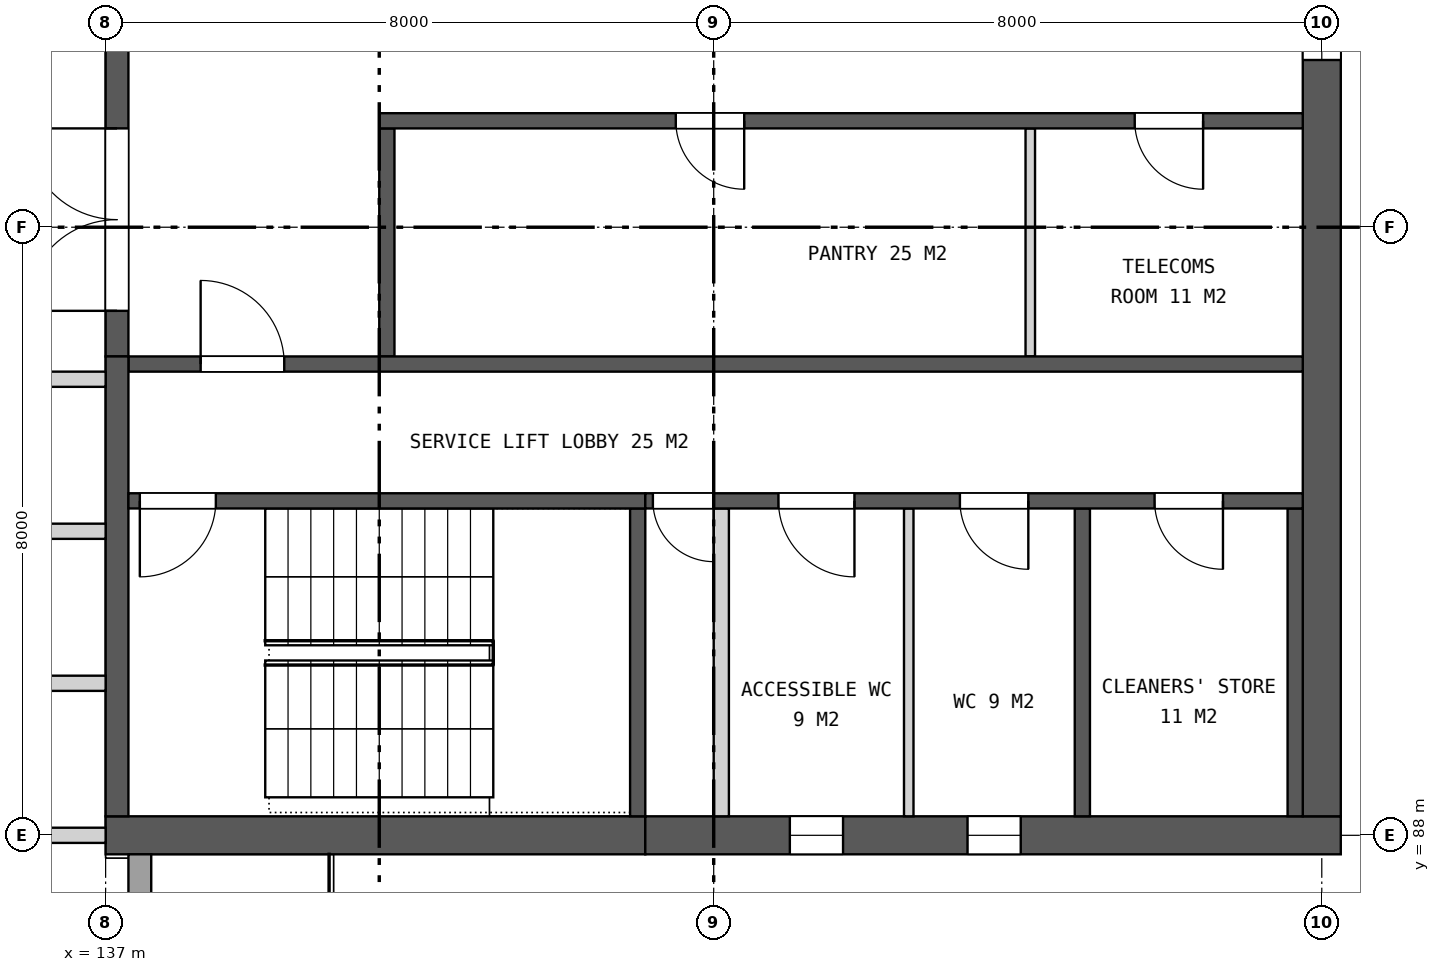
"""IFC4 building model, lengths in metres.
Left out: names, types, materials, properties, quantities, classifications, styles, units other than length and angle.
Written with IfcOpenShell. Run it as: python <this file> out.ifc"""

import sys

from ifc_helpers import new_model, si_unit, direction, frame, frame_2d, origin, place, context, subcontext, project, spatial, rectangle, extrude, element, fill, save


model = new_model("IFC4")
c1 = context("Model", 3, precision=1e-05, world=origin(), true_north=direction((0.0, 1.0)))
c2 = subcontext(c1, "Body", "Model", "MODEL_VIEW")
j1 = project(units=[si_unit("LENGTHUNIT", "METRE"), si_unit("PLANEANGLEUNIT", "RADIAN")], contexts=[c1])
p1 = place(None, origin())
s1 = spatial("IfcSite", under=j1, at=p1, CompositionType="ELEMENT")
p2 = place(p1, origin())
s2 = spatial("IfcBuilding", under=s1, at=p2, CompositionType="ELEMENT")
p3 = place(p2, frame((0.0, 0.0, 245.1)))
s3 = spatial("IfcBuildingStorey", under=s2, at=p3, CompositionType="ELEMENT", Elevation=245.1)
p4 = place(p3, frame((137.0, 88.0, 0.0), z_axis=(0.0, 0.0, 1.0), x_axis=(1.0, 0.0, 0.0)))
e1 = element("IfcWall", 1, at=p4, inside=s3, PredefinedType="SHEAR", context=c2, shape_type="SweptSolid", body=[
    extrude(rectangle(XDim=7.1, YDim=0.5, at=frame_2d((3.55, 0.0))), origin(), (0.0, 0.0, 1.0), 4.2),
])
p5 = place(p3, frame((144.1, 88.0, 0.0), z_axis=(0.0, 0.0, 1.0), x_axis=(1.0, 0.0, 0.0)))
e2 = element("IfcWall", 2, at=p5, inside=s3, PredefinedType="SHEAR", context=c2, shape_type="SweptSolid", body=[
    extrude(rectangle(XDim=9.15, YDim=0.5, at=frame_2d((4.575, 0.0))), origin(), (0.0, 0.0, 1.0), 4.2),
])
p6 = place(p5, frame((1.902, 0.0, 1.5)))
e3 = element("IfcOpeningElement", 3, at=p6, cuts=e2, PredefinedType="OPENING", context=c2, shape_type="SweptSolid", body=[
    extrude(rectangle(XDim=0.7, YDim=0.9, at=frame_2d((0.35, 0.45))), frame((0.0, 0.26, 0.0), z_axis=(0.0, -1.0, 0.0), x_axis=(1.0, 0.0, 0.0)), (0.0, 0.0, 1.0), 0.52),
])
p7 = place(p5, frame((4.239, 0.0, 1.5)))
e4 = element("IfcOpeningElement", 4, at=p7, cuts=e2, PredefinedType="OPENING", context=c2, shape_type="SweptSolid", body=[
    extrude(rectangle(XDim=0.7, YDim=0.9, at=frame_2d((0.35, 0.45))), frame((0.0, 0.26, 0.0), z_axis=(0.0, -1.0, 0.0), x_axis=(1.0, 0.0, 0.0)), (0.0, 0.0, 1.0), 0.52),
])
p8 = place(p3, frame((153.0, 88.25, 0.0), z_axis=(0.0, 0.0, 1.0), x_axis=(0.0, 1.0, 0.0)))
e5 = element("IfcWall", 5, at=p8, inside=s3, PredefinedType="SHEAR", context=c2, shape_type="SweptSolid", body=[
    extrude(rectangle(XDim=23.5, YDim=0.5, at=frame_2d((11.75, 0.0))), origin(), (0.0, 0.0, 1.0), 4.2),
])
p9 = place(p8, frame((9.95, 0.0, 0.15)))
e6 = element("IfcOpeningElement", 6, at=p9, cuts=e5, PredefinedType="OPENING", context=c2, shape_type="SweptSolid", body=[
    extrude(rectangle(XDim=3.6, YDim=3.0, at=frame_2d((1.8, 1.5))), frame((0.0, 0.26, 0.0), z_axis=(0.0, -1.0, 0.0), x_axis=(1.0, 0.0, 0.0)), (0.0, 0.0, 1.0), 0.52),
])
p10 = place(p3, frame((137.15, 94.3, 0.0), z_axis=(0.0, 0.0, 1.0), x_axis=(0.0, 1.0, 0.0)))
e7 = element("IfcWall", 7, at=p10, inside=s3, PredefinedType="SHEAR", context=c2, shape_type="SweptSolid", body=[
    extrude(rectangle(XDim=11.4, YDim=0.3, at=frame_2d((5.7, 0.0))), origin(), (0.0, 0.0, 1.0), 4.2),
])
p11 = place(p10, frame((0.6, 0.0, 0.0)))
e8 = element("IfcOpeningElement", 8, at=p11, cuts=e7, PredefinedType="OPENING", context=c2, shape_type="SweptSolid", body=[
    extrude(rectangle(XDim=2.4, YDim=2.4, at=frame_2d((1.2, 1.2))), frame((0.0, 0.16, 0.0), z_axis=(0.0, -1.0, 0.0), x_axis=(1.0, 0.0, 0.0)), (0.0, 0.0, 1.0), 0.32),
])
p12 = place(p10, frame((4.5, 0.0, 0.0)))
e9 = element("IfcOpeningElement", 9, at=p12, cuts=e7, PredefinedType="OPENING", context=c2, shape_type="SweptSolid", body=[
    extrude(rectangle(XDim=2.4, YDim=2.4, at=frame_2d((1.2, 1.2))), frame((0.0, 0.16, 0.0), z_axis=(0.0, -1.0, 0.0), x_axis=(1.0, 0.0, 0.0)), (0.0, 0.0, 1.0), 0.32),
])
p13 = place(p10, frame((8.4, 0.0, 0.0)))
e10 = element("IfcOpeningElement", 10, at=p13, cuts=e7, PredefinedType="OPENING", context=c2, shape_type="SweptSolid", body=[
    extrude(rectangle(XDim=2.4, YDim=2.4, at=frame_2d((1.2, 1.2))), frame((0.0, 0.16, 0.0), z_axis=(0.0, -1.0, 0.0), x_axis=(1.0, 0.0, 0.0)), (0.0, 0.0, 1.0), 0.32),
])
p14 = place(p3, frame((140.7, 94.3, 0.0), z_axis=(0.0, 0.0, 1.0), x_axis=(0.0, 1.0, 0.0)))
e11 = element("IfcWall", 11, at=p14, inside=s3, PredefinedType="SHEAR", context=c2, shape_type="SweptSolid", body=[
    extrude(rectangle(XDim=3.0, YDim=0.2, at=frame_2d((1.5, 0.0))), origin(), (0.0, 0.0, 1.0), 4.2),
])
p15 = place(p3, frame((149.165, 94.3, 0.0), z_axis=(0.0, 0.0, 1.0), x_axis=(0.0, 1.0, 0.0)))
e12 = element("IfcWall", 12, at=p15, inside=s3, PredefinedType="PARTITIONING", context=c2, shape_type="SweptSolid", body=[
    extrude(rectangle(XDim=3.0, YDim=0.125, at=frame_2d((1.5, 0.0))), origin(), (0.0, 0.0, 1.0), 4.2),
])
p16 = place(p3, frame((140.6, 97.4, 0.0), z_axis=(0.0, 0.0, 1.0), x_axis=(1.0, 0.0, 0.0)))
e13 = element("IfcWall", 13, at=p16, inside=s3, PredefinedType="SHEAR", context=c2, shape_type="SweptSolid", body=[
    extrude(rectangle(XDim=12.15, YDim=0.2, at=frame_2d((6.075, 0.0))), origin(), (0.0, 0.0, 1.0), 4.2),
])
p17 = place(p16, frame((3.901, 0.0, 0.0)))
e14 = element("IfcOpeningElement", 14, at=p17, cuts=e13, PredefinedType="OPENING", context=c2, shape_type="SweptSolid", body=[
    extrude(rectangle(XDim=0.9, YDim=2.1, at=frame_2d((0.45, 1.05))), frame((0.0, 0.11, 0.0), z_axis=(0.0, -1.0, 0.0), x_axis=(1.0, 0.0, 0.0)), (0.0, 0.0, 1.0), 0.22),
])
p18 = place(p16, frame((9.939, 0.0, 0.0)))
e15 = element("IfcOpeningElement", 15, at=p18, cuts=e13, PredefinedType="OPENING", context=c2, shape_type="SweptSolid", body=[
    extrude(rectangle(XDim=0.9, YDim=2.1, at=frame_2d((0.45, 1.05))), frame((0.0, 0.11, 0.0), z_axis=(0.0, -1.0, 0.0), x_axis=(1.0, 0.0, 0.0)), (0.0, 0.0, 1.0), 0.22),
])
p19 = place(p3, frame((137.3, 94.2, 0.0), z_axis=(0.0, 0.0, 1.0), x_axis=(1.0, 0.0, 0.0)))
e16 = element("IfcWall", 16, at=p19, inside=s3, PredefinedType="SHEAR", context=c2, shape_type="SweptSolid", body=[
    extrude(rectangle(XDim=15.45, YDim=0.2, at=frame_2d((7.725, 0.0))), origin(), (0.0, 0.0, 1.0), 4.2),
])
p20 = place(p19, frame((0.95, 0.0, 0.0)))
e17 = element("IfcOpeningElement", 17, at=p20, cuts=e16, PredefinedType="OPENING", context=c2, shape_type="SweptSolid", body=[
    extrude(rectangle(XDim=1.1, YDim=2.1, at=frame_2d((0.55, 1.05))), frame((0.0, 0.11, 0.0), z_axis=(0.0, -1.0, 0.0), x_axis=(1.0, 0.0, 0.0)), (0.0, 0.0, 1.0), 0.22),
])
p21 = place(p3, frame((137.15, 88.25, 0.0), z_axis=(0.0, 0.0, 1.0), x_axis=(0.0, 1.0, 0.0)))
e18 = element("IfcWall", 18, at=p21, inside=s3, PredefinedType="SHEAR", context=c2, shape_type="SweptSolid", body=[
    extrude(rectangle(XDim=6.05, YDim=0.3, at=frame_2d((3.025, 0.0))), origin(), (0.0, 0.0, 1.0), 4.2),
])
for number, where, z_axis, x_axis in (
    (19, (144.0, 88.25, 0.0), (0.0, 0.0, 1.0), (0.0, 1.0, 0.0)),
    (20, (149.85, 88.25, 0.0), (0.0, 0.0, 1.0), (0.0, 1.0, 0.0)),
    (21, (152.65, 88.25, 0.0), (0.0, 0.0, 1.0), (0.0, 1.0, 0.0)),
):
    element("IfcWall", number, at=place(p3, frame(where, z_axis=z_axis, x_axis=x_axis)), inside=s3, PredefinedType="SHEAR", context=c2, shape_type="SweptSolid", body=[
        extrude(rectangle(XDim=4.05, YDim=0.2, at=frame_2d((2.025, 0.0))), origin(), (0.0, 0.0, 1.0), 4.2),
    ])
p22 = place(p3, frame((145.1, 88.25, 0.0), z_axis=(0.0, 0.0, 1.0), x_axis=(0.0, 1.0, 0.0)))
e22 = element("IfcWall", 22, at=p22, inside=s3, PredefinedType="PARTITIONING", context=c2, shape_type="SweptSolid", body=[
    extrude(rectangle(XDim=4.05, YDim=0.2, at=frame_2d((2.025, 0.0))), origin(), (0.0, 0.0, 1.0), 4.2),
])
p23 = place(p3, frame((147.566, 88.25, 0.0), z_axis=(0.0, 0.0, 1.0), x_axis=(0.0, 1.0, 0.0)))
e23 = element("IfcWall", 23, at=p23, inside=s3, PredefinedType="PARTITIONING", context=c2, shape_type="SweptSolid", body=[
    extrude(rectangle(XDim=4.05, YDim=0.125, at=frame_2d((2.025, 0.0))), origin(), (0.0, 0.0, 1.0), 4.2),
])
p24 = place(p3, frame((137.3, 92.4, 0.0), z_axis=(0.0, 0.0, 1.0), x_axis=(1.0, 0.0, 0.0)))
e24 = element("IfcWall", 24, at=p24, inside=s3, PredefinedType="SHEAR", context=c2, shape_type="SweptSolid", body=[
    extrude(rectangle(XDim=6.8, YDim=0.2, at=frame_2d((3.4, 0.0))), origin(), (0.0, 0.0, 1.0), 4.2),
])
p25 = place(p24, frame((0.15, 0.0, 0.0)))
e25 = element("IfcOpeningElement", 25, at=p25, cuts=e24, PredefinedType="OPENING", context=c2, shape_type="SweptSolid", body=[
    extrude(rectangle(XDim=1.0, YDim=2.1, at=frame_2d((0.5, 1.05))), frame((0.0, 0.11, 0.0), z_axis=(0.0, -1.0, 0.0), x_axis=(1.0, 0.0, 0.0)), (0.0, 0.0, 1.0), 0.22),
])
p26 = place(p3, frame((144.1, 92.4, 0.0), z_axis=(0.0, 0.0, 1.0), x_axis=(1.0, 0.0, 0.0)))
e26 = element("IfcWall", 26, at=p26, inside=s3, PredefinedType="SHEAR", context=c2, shape_type="SweptSolid", body=[
    extrude(rectangle(XDim=8.65, YDim=0.2, at=frame_2d((4.325, 0.0))), origin(), (0.0, 0.0, 1.0), 4.2),
])
p27 = place(p26, frame((0.1, 0.0, 0.0)))
e27 = element("IfcOpeningElement", 27, at=p27, cuts=e26, PredefinedType="OPENING", context=c2, shape_type="SweptSolid", body=[
    extrude(rectangle(XDim=0.8, YDim=2.1, at=frame_2d((0.4, 1.05))), frame((0.0, 0.11, 0.0), z_axis=(0.0, -1.0, 0.0), x_axis=(1.0, 0.0, 0.0)), (0.0, 0.0, 1.0), 0.22),
])
p28 = place(p26, frame((1.752, 0.0, 0.0)))
e28 = element("IfcOpeningElement", 28, at=p28, cuts=e26, PredefinedType="OPENING", context=c2, shape_type="SweptSolid", body=[
    extrude(rectangle(XDim=1.0, YDim=2.1, at=frame_2d((0.5, 1.05))), frame((0.0, 0.11, 0.0), z_axis=(0.0, -1.0, 0.0), x_axis=(1.0, 0.0, 0.0)), (0.0, 0.0, 1.0), 0.22),
])
p29 = place(p26, frame((4.139, 0.0, 0.0)))
e29 = element("IfcOpeningElement", 29, at=p29, cuts=e26, PredefinedType="OPENING", context=c2, shape_type="SweptSolid", body=[
    extrude(rectangle(XDim=0.9, YDim=2.1, at=frame_2d((0.45, 1.05))), frame((0.0, 0.11, 0.0), z_axis=(0.0, -1.0, 0.0), x_axis=(1.0, 0.0, 0.0)), (0.0, 0.0, 1.0), 0.22),
])
p30 = place(p26, frame((6.7, 0.0, 0.0)))
e30 = element("IfcOpeningElement", 30, at=p30, cuts=e26, PredefinedType="OPENING", context=c2, shape_type="SweptSolid", body=[
    extrude(rectangle(XDim=0.9, YDim=2.1, at=frame_2d((0.45, 1.05))), frame((0.0, 0.11, 0.0), z_axis=(0.0, -1.0, 0.0), x_axis=(1.0, 0.0, 0.0)), (0.0, 0.0, 1.0), 0.22),
])
p31 = place(p3, frame((137.45, 80.035, 0.0), z_axis=(0.0, 0.0, 1.0), x_axis=(0.0, 1.0, 0.0)))
e31 = element("IfcWall", 31, at=p31, inside=s3, PredefinedType="SOLIDWALL", context=c2, shape_type="SweptSolid", body=[
    extrude(rectangle(XDim=7.715, YDim=0.3, at=frame_2d((3.857, 0.0))), origin(), (0.0, 0.0, 1.0), 3.9),
])
p32 = place(p31, frame((2.765, 0.0, 0.0)))
e32 = element("IfcOpeningElement", 32, at=p32, cuts=e31, PredefinedType="OPENING", context=c2, shape_type="SweptSolid", body=[
    extrude(rectangle(XDim=2.4, YDim=2.4, at=frame_2d((1.2, 1.2))), frame((0.0, 0.16, 0.0), z_axis=(0.0, -1.0, 0.0), x_axis=(1.0, 0.0, 0.0)), (0.0, 0.0, 1.0), 0.32),
])
for number, where, z_axis, x_axis in (
    (33, (131.5, 88.0, 0.0), (0.0, 0.0, 1.0), (1.0, 0.0, 0.0)),
    (34, (131.5, 90.0, 0.0), (0.0, 0.0, 1.0), (1.0, 0.0, 0.0)),
    (35, (131.5, 92.0, 0.0), (0.0, 0.0, 1.0), (1.0, 0.0, 0.0)),
    (36, (131.5, 94.0, 0.0), (0.0, 0.0, 1.0), (1.0, 0.0, 0.0)),
):
    element("IfcWall", number, at=place(p3, frame(where, z_axis=z_axis, x_axis=x_axis)), inside=s3, PredefinedType="SOLIDWALL", context=c2, shape_type="SweptSolid", body=[
        extrude(rectangle(XDim=5.5, YDim=0.2, at=frame_2d((2.75, 0.0))), origin(), (0.0, 0.0, 1.0), 3.443),
    ])
p33 = place(p6, origin())
e37 = element("IfcWindow", 37, at=p33, inside=s3, PartitioningType="SINGLE_PANEL", PredefinedType="WINDOW", context=c2, shape_type="SweptSolid", body=[
    extrude(rectangle(XDim=0.7, YDim=0.9, at=frame_2d((0.35, 0.45))), frame((0.0, 0.03, 0.0), z_axis=(0.0, -1.0, 0.0), x_axis=(1.0, 0.0, 0.0)), (0.0, 0.0, 1.0), 0.06),
])
fill(e3, e37)
p34 = place(p7, origin())
e38 = element("IfcWindow", 38, at=p34, inside=s3, PartitioningType="SINGLE_PANEL", PredefinedType="WINDOW", context=c2, shape_type="SweptSolid", body=[
    extrude(rectangle(XDim=0.7, YDim=0.9, at=frame_2d((0.35, 0.45))), frame((0.0, 0.03, 0.0), z_axis=(0.0, -1.0, 0.0), x_axis=(1.0, 0.0, 0.0)), (0.0, 0.0, 1.0), 0.06),
])
fill(e4, e38)
p35 = place(p9, origin())
e39 = element("IfcWindow", 39, at=p35, inside=s3, PartitioningType="SINGLE_PANEL", PredefinedType="WINDOW", context=c2, shape_type="SweptSolid", body=[
    extrude(rectangle(XDim=3.6, YDim=3.0, at=frame_2d((1.8, 1.5))), frame((0.0, 0.03, 0.0), z_axis=(0.0, -1.0, 0.0), x_axis=(1.0, 0.0, 0.0)), (0.0, 0.0, 1.0), 0.06),
])
fill(e6, e39)
p36 = place(p11, origin())
e40 = element("IfcDoor", 40, at=p36, inside=s3, OperationType="DOUBLE_DOOR_SINGLE_SWING", PredefinedType="DOOR", context=c2, shape_type="SweptSolid", body=[
    extrude(rectangle(XDim=2.4, YDim=2.4, at=frame_2d((1.2, 1.2))), frame((0.0, 0.025, 0.0), z_axis=(0.0, -1.0, 0.0), x_axis=(1.0, 0.0, 0.0)), (0.0, 0.0, 1.0), 0.05),
])
fill(e8, e40)
p37 = place(p17, frame((0.9, 0.0, 0.0), z_axis=(0.0, 0.0, 1.0), x_axis=(-1.0, 0.0, 0.0)))
e41 = element("IfcDoor", 41, at=p37, inside=s3, OperationType="SINGLE_SWING_LEFT", PredefinedType="DOOR", context=c2, shape_type="SweptSolid", body=[
    extrude(rectangle(XDim=0.9, YDim=2.1, at=frame_2d((0.45, 1.05))), frame((0.0, 0.025, 0.0), z_axis=(0.0, -1.0, 0.0), x_axis=(1.0, 0.0, 0.0)), (0.0, 0.0, 1.0), 0.05),
])
fill(e14, e41)
p38 = place(p18, frame((0.9, 0.0, 0.0), z_axis=(0.0, 0.0, 1.0), x_axis=(-1.0, 0.0, 0.0)))
e42 = element("IfcDoor", 42, at=p38, inside=s3, OperationType="SINGLE_SWING_LEFT", PredefinedType="DOOR", context=c2, shape_type="SweptSolid", body=[
    extrude(rectangle(XDim=0.9, YDim=2.1, at=frame_2d((0.45, 1.05))), frame((0.0, 0.025, 0.0), z_axis=(0.0, -1.0, 0.0), x_axis=(1.0, 0.0, 0.0)), (0.0, 0.0, 1.0), 0.05),
])
fill(e15, e42)
p39 = place(p20, origin())
e43 = element("IfcDoor", 43, at=p39, inside=s3, OperationType="SINGLE_SWING_LEFT", PredefinedType="DOOR", context=c2, shape_type="SweptSolid", body=[
    extrude(rectangle(XDim=1.1, YDim=2.1, at=frame_2d((0.55, 1.05))), frame((0.0, 0.025, 0.0), z_axis=(0.0, -1.0, 0.0), x_axis=(1.0, 0.0, 0.0)), (0.0, 0.0, 1.0), 0.05),
])
fill(e17, e43)
p40 = place(p25, frame((1.0, 0.0, 0.0), z_axis=(0.0, 0.0, 1.0), x_axis=(-1.0, 0.0, 0.0)))
e44 = element("IfcDoor", 44, at=p40, inside=s3, OperationType="SINGLE_SWING_RIGHT", PredefinedType="DOOR", context=c2, shape_type="SweptSolid", body=[
    extrude(rectangle(XDim=1.0, YDim=2.1, at=frame_2d((0.5, 1.05))), frame((0.0, 0.025, 0.0), z_axis=(0.0, -1.0, 0.0), x_axis=(1.0, 0.0, 0.0)), (0.0, 0.0, 1.0), 0.05),
])
fill(e25, e44)
p41 = place(p27, frame((0.8, 0.0, 0.0), z_axis=(0.0, 0.0, 1.0), x_axis=(-1.0, 0.0, 0.0)))
e45 = element("IfcDoor", 45, at=p41, inside=s3, OperationType="SINGLE_SWING_LEFT", PredefinedType="DOOR", context=c2, shape_type="SweptSolid", body=[
    extrude(rectangle(XDim=0.8, YDim=2.1, at=frame_2d((0.4, 1.05))), frame((0.0, 0.025, 0.0), z_axis=(0.0, -1.0, 0.0), x_axis=(1.0, 0.0, 0.0)), (0.0, 0.0, 1.0), 0.05),
])
fill(e27, e45)
p42 = place(p28, frame((1.0, 0.0, 0.0), z_axis=(0.0, 0.0, 1.0), x_axis=(-1.0, 0.0, 0.0)))
e46 = element("IfcDoor", 46, at=p42, inside=s3, OperationType="SINGLE_SWING_LEFT", PredefinedType="DOOR", context=c2, shape_type="SweptSolid", body=[
    extrude(rectangle(XDim=1.0, YDim=2.1, at=frame_2d((0.5, 1.05))), frame((0.0, 0.025, 0.0), z_axis=(0.0, -1.0, 0.0), x_axis=(1.0, 0.0, 0.0)), (0.0, 0.0, 1.0), 0.05),
])
fill(e28, e46)
p43 = place(p29, frame((0.9, 0.0, 0.0), z_axis=(0.0, 0.0, 1.0), x_axis=(-1.0, 0.0, 0.0)))
e47 = element("IfcDoor", 47, at=p43, inside=s3, OperationType="SINGLE_SWING_LEFT", PredefinedType="DOOR", context=c2, shape_type="SweptSolid", body=[
    extrude(rectangle(XDim=0.9, YDim=2.1, at=frame_2d((0.45, 1.05))), frame((0.0, 0.025, 0.0), z_axis=(0.0, -1.0, 0.0), x_axis=(1.0, 0.0, 0.0)), (0.0, 0.0, 1.0), 0.05),
])
fill(e29, e47)
p44 = place(p30, frame((0.9, 0.0, 0.0), z_axis=(0.0, 0.0, 1.0), x_axis=(-1.0, 0.0, 0.0)))
e48 = element("IfcDoor", 48, at=p44, inside=s3, OperationType="SINGLE_SWING_LEFT", PredefinedType="DOOR", context=c2, shape_type="SweptSolid", body=[
    extrude(rectangle(XDim=0.9, YDim=2.1, at=frame_2d((0.45, 1.05))), frame((0.0, 0.025, 0.0), z_axis=(0.0, -1.0, 0.0), x_axis=(1.0, 0.0, 0.0)), (0.0, 0.0, 1.0), 0.05),
])
fill(e30, e48)
save(model, sys.argv[1])
